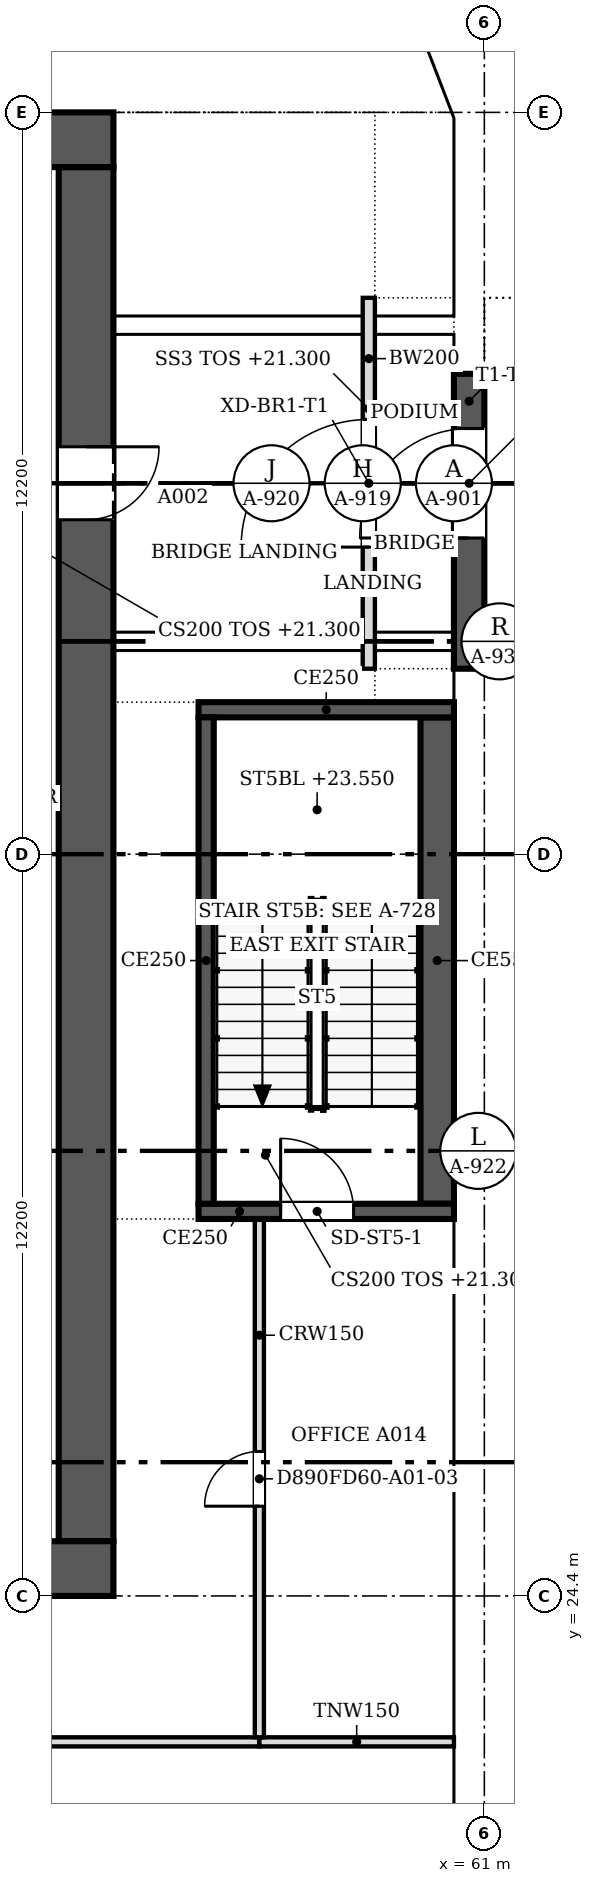
"""IFC4 building model, lengths in metres.
Left out: names, types, materials, properties, quantities, classifications, styles, units other than length and angle.
Written with IfcOpenShell. Run it as: python <this file> out.ifc"""

import sys

from ifc_helpers import new_model, si_unit, direction, frame, frame_2d, origin, place, context, subcontext, project, spatial, polyline, rectangle, outline, extrude, faceted_brep, source, transform, mapped, element, fill, save


model = new_model("IFC4")
c1 = context("Model", 3, precision=1e-05, world=origin(), true_north=direction((0.0, 1.0)))
c2 = subcontext(c1, "Body", "Model", "MODEL_VIEW")
j1 = project(units=[si_unit("LENGTHUNIT", "METRE"), si_unit("PLANEANGLEUNIT", "RADIAN")], contexts=[c1])
p1 = place(None, origin())
s1 = spatial("IfcSite", under=j1, at=p1, CompositionType="ELEMENT")
p2 = place(p1, origin())
s2 = spatial("IfcBuilding", under=s1, at=p2, CompositionType="ELEMENT")
p3 = place(p2, frame((0.0, 0.0, 21.3)))
s3 = spatial("IfcBuildingStorey", under=s2, at=p3, CompositionType="ELEMENT", Elevation=21.3)
m1 = source(origin(), c2, "Body", "SweptSolid", [
    extrude(outline(polyline([(3.05, 0.0), (6.1, 4.5), (3.05, 9.0), (0.0, 4.5), (3.05, 0.0)])), frame((0.0, 0.25, 0.0), z_axis=(0.0, -1.0, 0.0), x_axis=(1.0, 0.0, 0.0)), (0.0, 0.0, 1.0), 0.5),
])
p4 = place(p3, frame((60.75, 15.25, -4.5), z_axis=(0.0, 0.0, 1.0), x_axis=(0.0, 1.0, 0.0)))
e1 = element("IfcWall", 1, at=p4, inside=s3, PredefinedType="SOLIDWALL", context=c2, shape_type="MappedRepresentation", body=[
    mapped(m1, transform((0.0, 0.0, 0.0), scale=1.0)),
])
m2 = source(origin(), c2, "Body", "SweptSolid", [
    extrude(outline(polyline([(3.05, 0.446), (5.798, 4.5), (3.05, 8.554), (0.302, 4.5), (3.05, 0.446)])), frame((0.0, 0.26, 0.0), z_axis=(0.0, -1.0, 0.0), x_axis=(1.0, 0.0, 0.0)), (0.0, 0.0, 1.0), 0.52),
])
p5 = place(p4, origin())
e2 = element("IfcOpeningElement", 2, at=p5, cuts=e1, PredefinedType="OPENING", context=c2, shape_type="MappedRepresentation", body=[
    mapped(m2, transform((0.0, 0.0, 0.0), scale=1.0)),
])
m3 = source(origin(), c2, "Body", "Brep", [
    faceted_brep([(3.05, -0.25, 0.0), (6.1, -0.25, 4.5), (6.1, -0.25, 4.5), (3.05, -0.25, 9.0), (0.0, -0.25, 4.5), (0.0, 0.25, 4.5), (3.05, 0.25, 9.0), (6.1, 0.25, 4.5), (6.1, 0.25, 4.5), (3.05, 0.25, 0.0)], [[[0, 1, 2, 3, 4]], [[5, 6, 7, 8, 9]], [[9, 8, 1, 0]], [[7, 6, 3, 2]], [[6, 5, 4, 3]], [[5, 9, 0, 4]], [[1, 8, 7, 2]]]),
])
p6 = place(p3, frame((60.75, 21.35, -4.5), z_axis=(0.0, 0.0, 1.0), x_axis=(0.0, 1.0, 0.0)))
e3 = element("IfcWall", 3, at=p6, inside=s3, PredefinedType="SOLIDWALL", context=c2, shape_type="MappedRepresentation", body=[
    mapped(m3, transform((0.0, 0.0, 0.0), scale=1.0)),
])
p7 = place(p6, origin())
e4 = element("IfcOpeningElement", 4, at=p7, cuts=e3, PredefinedType="OPENING", context=c2, shape_type="MappedRepresentation", body=[
    mapped(m2, transform((0.0, 0.0, 0.0), scale=1.0)),
])
p8 = place(p3, frame((60.75, 27.45, -4.5), z_axis=(0.0, 0.0, 1.0), x_axis=(0.0, 1.0, 0.0)))
e5 = element("IfcWall", 5, at=p8, inside=s3, PredefinedType="SOLIDWALL", context=c2, shape_type="MappedRepresentation", body=[
    mapped(m1, transform((0.0, 0.0, 0.0), scale=1.0)),
])
p9 = place(p8, origin())
e6 = element("IfcOpeningElement", 6, at=p9, cuts=e5, PredefinedType="OPENING", context=c2, shape_type="MappedRepresentation", body=[
    mapped(m2, transform((0.0, 0.0, 0.0), scale=1.0)),
])
p10 = place(p3, frame((60.75, 33.55, -4.5), z_axis=(0.0, 0.0, 1.0), x_axis=(0.0, 1.0, 0.0)))
e7 = element("IfcWall", 7, at=p10, inside=s3, PredefinedType="SOLIDWALL", context=c2, shape_type="MappedRepresentation", body=[
    mapped(m3, transform((0.0, 0.0, 0.0), scale=1.0)),
])
p11 = place(p10, origin())
e8 = element("IfcOpeningElement", 8, at=p11, cuts=e7, PredefinedType="OPENING", context=c2, shape_type="MappedRepresentation", body=[
    mapped(m2, transform((0.0, 0.0, 0.0), scale=1.0)),
])
m4 = source(origin(), c2, "Body", "SweptSolid", [
    extrude(outline(polyline([(3.05, 0.0), (4.85, 2.656), (4.85, 6.344), (3.05, 9.0), (0.0, 4.5), (3.05, 0.0)])), frame((0.0, 0.25, 0.0), z_axis=(0.0, -1.0, 0.0), x_axis=(1.0, 0.0, 0.0)), (0.0, 0.0, 1.0), 0.5),
])
p12 = place(p3, frame((60.75, 39.65, -4.5), z_axis=(0.0, 0.0, 1.0), x_axis=(0.0, 1.0, 0.0)))
e9 = element("IfcWall", 9, at=p12, inside=s3, PredefinedType="SOLIDWALL", context=c2, shape_type="MappedRepresentation", body=[
    mapped(m4, transform((0.0, 0.0, 0.0), scale=1.0)),
])
m5 = source(origin(), c2, "Body", "SweptSolid", [
    extrude(rectangle(XDim=1.8, YDim=2.4, at=frame_2d((0.9, 1.2))), frame((0.0, 0.26, 0.0), z_axis=(0.0, -1.0, 0.0), x_axis=(1.0, 0.0, 0.0)), (0.0, 0.0, 1.0), 0.52),
])
p13 = place(p12, frame((2.15, 0.0, 4.5)))
e10 = element("IfcOpeningElement", 10, at=p13, cuts=e9, PredefinedType="OPENING", context=c2, shape_type="MappedRepresentation", body=[
    mapped(m5, transform((0.0, 0.0, 0.0), scale=1.0)),
])
m6 = source(origin(), c2, "Body", "Brep", [
    faceted_brep([(1.753, -0.25, 0.0), (1.8, -0.25, 0.071), (1.8, -0.25, 8.929), (1.753, -0.25, 9.0), (0.0, -0.25, 6.373), (0.0, -0.25, 2.627), (0.0, 0.25, 2.627), (0.0, 0.25, 6.373), (1.707, 0.25, 8.93), (1.707, 0.25, 0.07), (1.753, 0.0, 0.0), (1.753, 0.0, 9.0)], [[[0, 1, 2, 3, 4, 5]], [[6, 7, 8, 9]], [[1, 0, 10]], [[11, 3, 2]], [[8, 7, 4, 3, 11]], [[7, 6, 5, 4]], [[6, 9, 10, 0, 5]], [[1, 10, 9, 8, 11, 2]]]),
])
p14 = place(p3, frame((60.75, 47.0, -4.5), z_axis=(0.0, 0.0, 1.0), x_axis=(0.0, 1.0, 0.0)))
e11 = element("IfcWall", 11, at=p14, inside=s3, PredefinedType="SOLIDWALL", context=c2, shape_type="MappedRepresentation", body=[
    mapped(m6, transform((0.0, 0.0, 0.0), scale=1.0)),
])
m7 = source(origin(), c2, "Body", "SweptSolid", [
    extrude(outline(polyline([(1.553, 8.25), (0.0, 5.922), (0.0, 3.077), (1.553, 0.75), (1.553, 8.25)])), frame((0.0, 0.26, 0.0), z_axis=(0.0, -1.0, 0.0), x_axis=(1.0, 0.0, 0.0)), (0.0, 0.0, 1.0), 0.52),
])
p15 = place(p14, origin())
e12 = element("IfcOpeningElement", 12, at=p15, cuts=e11, PredefinedType="OPENING", context=c2, shape_type="MappedRepresentation", body=[
    mapped(m7, transform((0.0, 0.0, 0.0), scale=1.0)),
])
m8 = source(origin(), c2, "Body", "Brep", [
    faceted_brep([(0.047, -0.25, 0.0), (2.997, -0.25, 4.5), (0.047, -0.25, 9.0), (0.0, -0.25, 8.93), (0.0, -0.25, 0.07), (0.093, 0.25, 8.929), (2.944, 0.25, 4.581), (2.944, 0.25, 4.419), (0.093, 0.25, 0.071), (2.997, 0.0, 4.5), (0.047, 0.0, 0.0), (0.047, 0.0, 9.0)], [[[0, 1, 2, 3, 4]], [[5, 6, 7, 8]], [[8, 7, 9, 1, 0, 10]], [[6, 5, 11, 2, 1, 9]], [[3, 2, 11]], [[10, 0, 4]], [[8, 10, 4, 3, 11, 5]], [[9, 7, 6]]]),
])
p16 = place(p3, frame((60.767, 48.71, -4.5), z_axis=(0.0, 0.0, 1.0), x_axis=(-0.359901446078, 0.932990326376, 0.0)))
e13 = element("IfcWall", 13, at=p16, inside=s3, PredefinedType="SOLIDWALL", context=c2, shape_type="MappedRepresentation", body=[
    mapped(m8, transform((0.0, 0.0, 0.0), scale=1.0)),
])
m9 = source(origin(), c2, "Body", "SweptSolid", [
    extrude(outline(polyline([(0.247, 0.761), (2.698, 4.5), (0.247, 8.239), (0.247, 0.761)])), frame((0.0, 0.26, 0.0), z_axis=(0.0, -1.0, 0.0), x_axis=(1.0, 0.0, 0.0)), (0.0, 0.0, 1.0), 0.52),
])
p17 = place(p16, origin())
e14 = element("IfcOpeningElement", 14, at=p17, cuts=e13, PredefinedType="OPENING", context=c2, shape_type="MappedRepresentation", body=[
    mapped(m9, transform((0.0, 0.0, 0.0), scale=1.0)),
])
m10 = source(origin(), c2, "Body", "Brep", [
    faceted_brep([(3.05, -0.25, 0.0), (6.1, -0.25, 4.5), (6.1, -0.25, 4.5), (0.0, -0.25, 4.5), (0.0, 0.25, 4.5), (6.1, 0.25, 4.5), (6.1, 0.25, 4.5), (3.05, 0.25, 0.0)], [[[0, 1, 2, 3]], [[4, 5, 6, 7]], [[7, 6, 1, 0]], [[5, 4, 3, 2]], [[4, 7, 0, 3]], [[1, 6, 5, 2]]]),
])
p18 = place(p3, frame((60.75, 18.3, 0.0), z_axis=(0.0, 0.0, 1.0), x_axis=(0.0, 1.0, 0.0)))
e15 = element("IfcWall", 15, at=p18, inside=s3, PredefinedType="SOLIDWALL", context=c2, shape_type="MappedRepresentation", body=[
    mapped(m10, transform((0.0, 0.0, 0.0), scale=1.0)),
])
m11 = source(origin(), c2, "Body", "SweptSolid", [
    extrude(outline(polyline([(3.05, 0.446), (5.629, 4.25), (0.471, 4.25), (3.05, 0.446)])), frame((0.0, 0.26, 0.0), z_axis=(0.0, -1.0, 0.0), x_axis=(1.0, 0.0, 0.0)), (0.0, 0.0, 1.0), 0.52),
])
p19 = place(p18, origin())
e16 = element("IfcOpeningElement", 16, at=p19, cuts=e15, PredefinedType="OPENING", context=c2, shape_type="MappedRepresentation", body=[
    mapped(m11, transform((0.0, 0.0, 0.0), scale=1.0)),
])
m12 = source(origin(), c2, "Body", "SweptSolid", [
    extrude(outline(polyline([(3.05, 0.0), (6.1, 4.5), (0.0, 4.5), (3.05, 0.0)])), frame((0.0, 0.25, 0.0), z_axis=(0.0, -1.0, 0.0), x_axis=(1.0, 0.0, 0.0)), (0.0, 0.0, 1.0), 0.5),
])
p20 = place(p3, frame((60.75, 24.4, 0.0), z_axis=(0.0, 0.0, 1.0), x_axis=(0.0, 1.0, 0.0)))
e17 = element("IfcWall", 17, at=p20, inside=s3, PredefinedType="SOLIDWALL", context=c2, shape_type="MappedRepresentation", body=[
    mapped(m12, transform((0.0, 0.0, 0.0), scale=1.0)),
])
p21 = place(p20, origin())
e18 = element("IfcOpeningElement", 18, at=p21, cuts=e17, PredefinedType="OPENING", context=c2, shape_type="MappedRepresentation", body=[
    mapped(m11, transform((0.0, 0.0, 0.0), scale=1.0)),
])
p22 = place(p3, frame((60.75, 30.5, 0.0), z_axis=(0.0, 0.0, 1.0), x_axis=(0.0, 1.0, 0.0)))
e19 = element("IfcWall", 19, at=p22, inside=s3, PredefinedType="SOLIDWALL", context=c2, shape_type="MappedRepresentation", body=[
    mapped(m12, transform((0.0, 0.0, 0.0), scale=1.0)),
])
p23 = place(p22, origin())
e20 = element("IfcOpeningElement", 20, at=p23, cuts=e19, PredefinedType="OPENING", context=c2, shape_type="MappedRepresentation", body=[
    mapped(m11, transform((0.0, 0.0, 0.0), scale=1.0)),
])
m13 = source(origin(), c2, "Body", "Brep", [
    faceted_brep([(3.05, -0.25, 0.0), (4.85, -0.25, 2.656), (4.85, -0.25, 4.5), (0.0, -0.25, 4.5), (0.0, 0.25, 4.5), (4.85, 0.25, 4.5), (4.85, 0.25, 2.656), (3.05, 0.25, 0.0)], [[[0, 1, 2, 3]], [[4, 5, 6, 7]], [[7, 6, 1, 0]], [[5, 4, 3, 2]], [[4, 7, 0, 3]], [[1, 6, 5, 2]]]),
])
p24 = place(p3, frame((60.75, 36.6, 0.0), z_axis=(0.0, 0.0, 1.0), x_axis=(0.0, 1.0, 0.0)))
e21 = element("IfcWall", 21, at=p24, inside=s3, PredefinedType="SOLIDWALL", context=c2, shape_type="MappedRepresentation", body=[
    mapped(m13, transform((0.0, 0.0, 0.0), scale=1.0)),
])
m14 = source(origin(), c2, "Body", "SweptSolid", [
    extrude(outline(polyline([(3.05, 0.446), (4.85, 3.101), (4.85, 4.25), (0.471, 4.25), (3.05, 0.446)])), frame((0.0, 0.26, 0.0), z_axis=(0.0, -1.0, 0.0), x_axis=(1.0, 0.0, 0.0)), (0.0, 0.0, 1.0), 0.52),
])
p25 = place(p24, origin())
e22 = element("IfcOpeningElement", 22, at=p25, cuts=e21, PredefinedType="OPENING", context=c2, shape_type="MappedRepresentation", body=[
    mapped(m14, transform((0.0, 0.0, 0.0), scale=1.0)),
])
m15 = source(origin(), c2, "Body", "Brep", [
    faceted_brep([(1.8, -0.25, 0.0), (4.803, -0.25, 4.5), (0.0, -0.25, 4.5), (0.0, -0.25, 2.656), (0.0, 0.25, 2.656), (0.0, 0.25, 4.5), (4.757, 0.25, 4.5), (4.757, 0.25, 4.43), (1.8, 0.25, 0.0), (4.803, 0.0, 4.5)], [[[0, 1, 2, 3]], [[4, 5, 6, 7, 8]], [[8, 7, 9, 1, 0]], [[6, 5, 2, 1, 9]], [[5, 4, 3, 2]], [[4, 8, 0, 3]], [[7, 6, 9]]]),
])
p26 = place(p3, frame((60.75, 43.95, 0.0), z_axis=(0.0, 0.0, 1.0), x_axis=(0.0, 1.0, 0.0)))
e23 = element("IfcWall", 23, at=p26, inside=s3, PredefinedType="SOLIDWALL", context=c2, shape_type="MappedRepresentation", body=[
    mapped(m15, transform((0.0, 0.0, 0.0), scale=1.0)),
])
m16 = source(origin(), c2, "Body", "SweptSolid", [
    extrude(outline(polyline([(1.798, 0.448), (4.336, 4.25), (0.0, 4.25), (0.0, 3.101), (1.798, 0.448)])), frame((0.0, 0.26, 0.0), z_axis=(0.0, -1.0, 0.0), x_axis=(1.0, 0.0, 0.0)), (0.0, 0.0, 1.0), 0.52),
])
p27 = place(p26, origin())
e24 = element("IfcOpeningElement", 24, at=p27, cuts=e23, PredefinedType="OPENING", context=c2, shape_type="MappedRepresentation", body=[
    mapped(m16, transform((0.0, 0.0, 0.0), scale=1.0)),
])
m17 = source(origin(), c2, "Body", "Brep", [
    faceted_brep([(2.95, -0.25, 0.0), (3.003, -0.25, 0.081), (3.003, -0.25, 4.5), (0.0, -0.25, 4.5), (0.047, 0.25, 4.5), (2.898, 0.25, 4.5), (2.898, 0.25, 0.081), (0.047, 0.25, 4.429), (2.95, 0.0, 0.0), (0.0, 0.0, 4.5)], [[[0, 1, 2, 3]], [[4, 5, 6, 7]], [[1, 0, 8]], [[5, 4, 9, 3, 2]], [[7, 6, 8, 0, 3, 9]], [[7, 9, 4]], [[1, 8, 6, 5, 2]]]),
])
p28 = place(p3, frame((60.75, 48.753, 0.0), z_axis=(0.0, 0.0, 1.0), x_axis=(-0.35992665181, 0.932980602862, 0.0)))
e25 = element("IfcWall", 25, at=p28, inside=s3, PredefinedType="SOLIDWALL", context=c2, shape_type="MappedRepresentation", body=[
    mapped(m17, transform((0.0, 0.0, 0.0), scale=1.0)),
])
m18 = source(origin(), c2, "Body", "SweptSolid", [
    extrude(outline(polyline([(2.75, 4.25), (0.463, 4.25), (2.75, 0.761), (2.75, 4.25)])), frame((0.0, 0.26, 0.0), z_axis=(0.0, -1.0, 0.0), x_axis=(1.0, 0.0, 0.0)), (0.0, 0.0, 1.0), 0.52),
])
p29 = place(p28, origin())
e26 = element("IfcOpeningElement", 26, at=p29, cuts=e25, PredefinedType="OPENING", context=c2, shape_type="MappedRepresentation", body=[
    mapped(m18, transform((0.0, 0.0, 0.0), scale=1.0)),
])
p30 = place(p3, frame((54.9, 24.85, 0.0), z_axis=(0.0, 0.0, 1.0), x_axis=(-1.0, 0.0, 0.0)))
e27 = element("IfcWall", 27, at=p30, inside=s3, PredefinedType="SHEAR", context=c2, shape_type="SweptSolid", body=[
    extrude(rectangle(XDim=24.4, YDim=0.9, at=frame_2d((12.2, 0.0))), origin(), (0.0, 0.0, 1.0), 4.5),
])
m19 = source(origin(), c2, "Body", "SweptSolid", [
    extrude(rectangle(XDim=1.2, YDim=2.1, at=frame_2d((0.6, 1.05))), frame((0.0, 0.46, 0.0), z_axis=(0.0, -1.0, 0.0), x_axis=(1.0, 0.0, 0.0)), (0.0, 0.0, 1.0), 0.92),
])
p31 = place(p30, frame((1.5, 0.0, 0.0)))
e28 = element("IfcOpeningElement", 28, at=p31, cuts=e27, PredefinedType="OPENING", context=c2, shape_type="MappedRepresentation", body=[
    mapped(m19, transform((0.0, 0.0, 0.0), scale=1.0)),
])
p32 = place(p3, frame((30.5, 48.35, 0.0), z_axis=(0.0, 0.0, 1.0), x_axis=(1.0, 0.0, 0.0)))
e29 = element("IfcWall", 29, at=p32, inside=s3, PredefinedType="SHEAR", context=c2, shape_type="SweptSolid", body=[
    extrude(rectangle(XDim=24.4, YDim=0.9, at=frame_2d((12.2, 0.0))), origin(), (0.0, 0.0, 1.0), 4.5),
])
p33 = place(p3, frame((54.45, 47.9, 0.0), z_axis=(0.0, 0.0, 1.0), x_axis=(0.0, -1.0, 0.0)))
e30 = element("IfcWall", 30, at=p33, inside=s3, PredefinedType="SHEAR", context=c2, shape_type="SweptSolid", body=[
    extrude(rectangle(XDim=22.6, YDim=0.9, at=frame_2d((11.3, 0.0))), origin(), (0.0, 0.0, 1.0), 4.5),
])
p34 = place(p33, frame((4.6, 0.0, 0.0)))
e31 = element("IfcOpeningElement", 31, at=p34, cuts=e30, PredefinedType="OPENING", context=c2, shape_type="MappedRepresentation", body=[
    mapped(m19, transform((0.0, 0.0, 0.0), scale=1.0)),
])
p35 = place(p3, frame((60.5, 30.725, 0.0), z_axis=(0.0, 0.0, 1.0), x_axis=(-1.0, 0.0, 0.0)))
e32 = element("IfcWall", 32, at=p35, inside=s3, PredefinedType="SOLIDWALL", context=c2, shape_type="SweptSolid", body=[
    extrude(rectangle(XDim=4.2, YDim=0.25, at=frame_2d((2.1, 0.0))), origin(), (0.0, 0.0, 1.0), 4.5),
])
m20 = source(origin(), c2, "Body", "SweptSolid", [
    extrude(rectangle(XDim=1.2, YDim=2.1, at=frame_2d((0.6, 1.05))), frame((0.0, 0.135, 0.0), z_axis=(0.0, -1.0, 0.0), x_axis=(1.0, 0.0, 0.0)), (0.0, 0.0, 1.0), 0.27),
])
p36 = place(p35, frame((1.65, 0.0, 0.0)))
e33 = element("IfcOpeningElement", 33, at=p36, cuts=e32, PredefinedType="OPENING", context=c2, shape_type="MappedRepresentation", body=[
    mapped(m20, transform((0.0, 0.0, 0.0), scale=1.0)),
])
p37 = place(p3, frame((56.425, 30.85, 0.0), z_axis=(0.0, 0.0, 1.0), x_axis=(0.0, 1.0, 0.0)))
e34 = element("IfcWall", 34, at=p37, inside=s3, PredefinedType="SOLIDWALL", context=c2, shape_type="SweptSolid", body=[
    extrude(rectangle(XDim=8.0, YDim=0.25, at=frame_2d((4.0, 0.0))), origin(), (0.0, 0.0, 1.0), 4.5),
])
p38 = place(p3, frame((56.3, 38.975, 0.0), z_axis=(0.0, 0.0, 1.0), x_axis=(1.0, 0.0, 0.0)))
e35 = element("IfcWall", 35, at=p38, inside=s3, PredefinedType="SOLIDWALL", context=c2, shape_type="SweptSolid", body=[
    extrude(rectangle(XDim=4.2, YDim=0.25, at=frame_2d((2.1, 0.0))), origin(), (0.0, 0.0, 1.0), 4.5),
])
p39 = place(p3, frame((60.225, 38.85, 0.0), z_axis=(0.0, 0.0, 1.0), x_axis=(0.0, -1.0, 0.0)))
e36 = element("IfcWall", 36, at=p39, inside=s3, PredefinedType="SOLIDWALL", context=c2, shape_type="SweptSolid", body=[
    extrude(rectangle(XDim=8.0, YDim=0.55, at=frame_2d((4.0, 0.0))), origin(), (0.0, 0.0, 1.0), 4.5),
])
p40 = place(p3, frame((59.1, 39.65, 0.0), z_axis=(0.0, 0.0, 1.0), x_axis=(0.0, 1.0, 0.0)))
e37 = element("IfcWall", 37, at=p40, inside=s3, PredefinedType="PARTITIONING", context=c2, shape_type="SweptSolid", body=[
    extrude(rectangle(XDim=6.1, YDim=0.2, at=frame_2d((3.05, 0.0))), origin(), (0.0, 0.0, 1.0), 3.767),
])
m21 = source(origin(), c2, "Body", "SweptSolid", [
    extrude(rectangle(XDim=2.1, YDim=2.1, at=frame_2d((1.05, 1.05))), frame((0.0, 0.11, 0.0), z_axis=(0.0, -1.0, 0.0), x_axis=(1.0, 0.0, 0.0)), (0.0, 0.0, 1.0), 0.22),
])
p41 = place(p40, frame((2.0, 0.0, 0.0)))
e38 = element("IfcOpeningElement", 38, at=p41, cuts=e37, PredefinedType="OPENING", context=c2, shape_type="MappedRepresentation", body=[
    mapped(m21, transform((0.0, 0.0, 0.0), scale=1.0)),
])
p42 = place(p3, frame((45.4, 22.0, 0.0), z_axis=(0.0, 0.0, 1.0), x_axis=(1.0, 0.0, 0.0)))
e39 = element("IfcWall", 39, at=p42, inside=s3, PredefinedType="PARTITIONING", context=c2, shape_type="SweptSolid", body=[
    extrude(rectangle(XDim=11.9, YDim=0.15, at=frame_2d((5.95, 0.0))), origin(), (0.0, 0.0, 1.0), 3.767),
])
p43 = place(p3, frame((57.301, 22.0, 0.0), z_axis=(0.0, 0.0, 1.0), x_axis=(1.0, 0.0, 0.0)))
e40 = element("IfcWall", 40, at=p43, inside=s3, PredefinedType="PARTITIONING", context=c2, shape_type="SweptSolid", body=[
    extrude(rectangle(XDim=3.199, YDim=0.15, at=frame_2d((1.6, 0.0))), origin(), (0.0, 0.0, 1.0), 3.767),
])
p44 = place(p3, frame((57.3, 30.6, 0.0), z_axis=(0.0, 0.0, 1.0), x_axis=(0.0, -1.0, 0.0)))
e41 = element("IfcWall", 41, at=p44, inside=s3, PredefinedType="PARTITIONING", context=c2, shape_type="SweptSolid", body=[
    extrude(rectangle(XDim=8.524, YDim=0.15, at=frame_2d((4.262, 0.0))), origin(), (0.0, 0.0, 1.0), 3.767),
])
m22 = source(origin(), c2, "Body", "SweptSolid", [
    extrude(rectangle(XDim=0.9, YDim=2.1, at=frame_2d((0.45, 1.05))), frame((0.0, 0.085, 0.0), z_axis=(0.0, -1.0, 0.0), x_axis=(1.0, 0.0, 0.0)), (0.0, 0.0, 1.0), 0.17),
])
p45 = place(p44, frame((3.824, 0.0, 0.0)))
e42 = element("IfcOpeningElement", 42, at=p45, cuts=e41, PredefinedType="OPENING", context=c2, shape_type="MappedRepresentation", body=[
    mapped(m22, transform((0.0, 0.0, 0.0), scale=1.0)),
])
m23 = source(origin(), c2, "Body", "SweptSolid", [
    extrude(rectangle(XDim=1.8, YDim=2.4, at=frame_2d((0.9, 1.2))), frame((0.0, 0.03, 0.0), z_axis=(0.0, -1.0, 0.0), x_axis=(1.0, 0.0, 0.0)), (0.0, 0.0, 1.0), 0.06),
])
p46 = place(p13, origin())
e43 = element("IfcDoor", 43, at=p46, inside=s3, OperationType="DOUBLE_DOOR_SINGLE_SWING", PredefinedType="DOOR", context=c2, shape_type="MappedRepresentation", body=[
    mapped(m23, transform((0.0, 0.0, 0.0), scale=1.0)),
])
fill(e10, e43)
m24 = source(origin(), c2, "Body", "SweptSolid", [
    extrude(rectangle(XDim=1.2, YDim=2.1, at=frame_2d((0.6, 1.05))), frame((0.0, 0.025, 0.0), z_axis=(0.0, -1.0, 0.0), x_axis=(1.0, 0.0, 0.0)), (0.0, 0.0, 1.0), 0.05),
])
p47 = place(p34, origin())
e44 = element("IfcDoor", 44, at=p47, inside=s3, OperationType="SINGLE_SWING_LEFT", PredefinedType="DOOR", context=c2, shape_type="MappedRepresentation", body=[
    mapped(m24, transform((0.0, 0.0, 0.0), scale=1.0)),
])
fill(e31, e44)
p48 = place(p36, origin())
e45 = element("IfcDoor", 45, at=p48, inside=s3, OperationType="SINGLE_SWING_RIGHT", PredefinedType="DOOR", context=c2, shape_type="MappedRepresentation", body=[
    mapped(m24, transform((0.0, 0.0, 0.0), scale=1.0)),
])
fill(e33, e45)
m25 = source(origin(), c2, "Body", "SweptSolid", [
    extrude(rectangle(XDim=2.1, YDim=2.1, at=frame_2d((1.05, 1.05))), frame((0.0, 0.025, 0.0), z_axis=(0.0, -1.0, 0.0), x_axis=(1.0, 0.0, 0.0)), (0.0, 0.0, 1.0), 0.05),
])
p49 = place(p41, origin())
e46 = element("IfcDoor", 46, at=p49, inside=s3, OperationType="DOUBLE_DOOR_SINGLE_SWING", PredefinedType="DOOR", context=c2, shape_type="MappedRepresentation", body=[
    mapped(m25, transform((0.0, 0.0, 0.0), scale=1.0)),
])
fill(e38, e46)
m26 = source(origin(), c2, "Body", "SweptSolid", [
    extrude(rectangle(XDim=0.9, YDim=2.1, at=frame_2d((0.45, 1.05))), frame((0.0, 0.025, 0.0), z_axis=(0.0, -1.0, 0.0), x_axis=(1.0, 0.0, 0.0)), (0.0, 0.0, 1.0), 0.05),
])
p50 = place(p45, origin())
e47 = element("IfcDoor", 47, at=p50, inside=s3, OperationType="SINGLE_SWING_RIGHT", PredefinedType="DOOR", context=c2, shape_type="MappedRepresentation", body=[
    mapped(m26, transform((0.0, 0.0, 0.0), scale=1.0)),
])
fill(e42, e47)
save(model, sys.argv[1])
